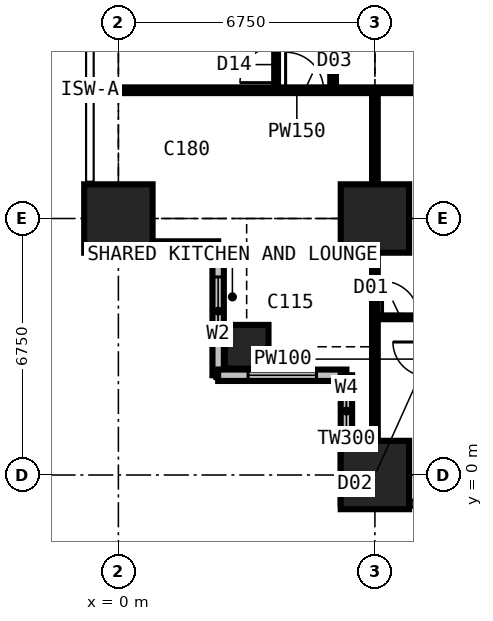
"""IFC4 building model, lengths in metres.
Left out: names, types, materials, properties, quantities, classifications, styles, units other than length and angle.
Written with IfcOpenShell. Run it as: python <this file> out.ifc"""

import sys

from ifc_helpers import new_model, si_unit, direction, frame, frame_2d, origin, origin_2d, place, context, subcontext, project, spatial, rectangle, extrude, element, fill, save


model = new_model("IFC4")
c1 = context("Model", 3, precision=1e-05, world=origin(), true_north=direction((0.0, 1.0)))
c2 = subcontext(c1, "Body", "Model", "MODEL_VIEW")
j1 = project(units=[si_unit("LENGTHUNIT", "METRE"), si_unit("PLANEANGLEUNIT", "RADIAN")], contexts=[c1])
p1 = place(None, origin())
s1 = spatial("IfcSite", under=j1, at=p1, CompositionType="ELEMENT")
p2 = place(p1, origin())
s2 = spatial("IfcBuilding", under=s1, at=p2, CompositionType="ELEMENT")
p3 = place(p2, frame((0.0, 0.0, 61.2)))
s3 = spatial("IfcBuildingStorey", under=s2, at=p3, CompositionType="ELEMENT", Elevation=61.2)
p4 = place(p3, frame((0.0, 6.75, 0.0), z_axis=(0.0, 0.0, 1.0), x_axis=(1.0, 0.0, 0.0)))
e1 = element("IfcColumn", 1, at=p4, inside=s3, PredefinedType="COLUMN", context=c2, shape_type="SweptSolid", body=[
    extrude(rectangle(XDim=1.8, YDim=1.8, at=origin_2d()), origin(), (0.0, 0.0, 1.0), 3.6),
])
p5 = place(p3, frame((3.375, 3.375, 0.0), z_axis=(0.0, 0.0, 1.0), x_axis=(1.0, 0.0, 0.0)))
e2 = element("IfcColumn", 2, at=p5, inside=s3, PredefinedType="COLUMN", context=c2, shape_type="SweptSolid", body=[
    extrude(rectangle(XDim=1.15, YDim=1.15, at=origin_2d()), origin(), (0.0, 0.0, 1.0), 3.6),
])
for number, where, z_axis, x_axis in (
    (3, (6.75, 0.0, 0.0), (0.0, 0.0, 1.0), (1.0, 0.0, 0.0)),
    (4, (6.75, 6.75, 0.0), (0.0, 0.0, 1.0), (1.0, 0.0, 0.0)),
):
    element("IfcColumn", number, at=place(p3, frame(where, z_axis=z_axis, x_axis=x_axis)), inside=s3, PredefinedType="COLUMN", context=c2, shape_type="SweptSolid", body=[
        extrude(rectangle(XDim=1.8, YDim=1.8, at=origin_2d()), origin(), (0.0, 0.0, 1.0), 3.6),
    ])
p6 = place(p3, frame((-0.75, 6.0, 0.0), z_axis=(0.0, 0.0, 1.0), x_axis=(1.0, 0.0, 0.0)))
e5 = element("IfcWall", 5, at=p6, inside=s3, PredefinedType="SOLIDWALL", context=c2, shape_type="SweptSolid", body=[
    extrude(rectangle(XDim=3.375, YDim=0.3, at=frame_2d((1.688, 0.0))), origin(), (0.0, 0.0, 1.0), 3.375),
])
p7 = place(p6, frame((1.833, 0.0, 0.9)))
e6 = element("IfcOpeningElement", 6, at=p7, cuts=e5, PredefinedType="OPENING", context=c2, shape_type="SweptSolid", body=[
    extrude(rectangle(XDim=1.2, YDim=1.8, at=frame_2d((0.6, 0.9))), frame((0.0, 0.16, 0.0), z_axis=(0.0, -1.0, 0.0), x_axis=(1.0, 0.0, 0.0)), (0.0, 0.0, 1.0), 0.32),
])
p8 = place(p3, frame((2.625, 6.0, 0.0), z_axis=(0.0, 0.0, 1.0), x_axis=(0.0, -1.0, 0.0)))
e7 = element("IfcWall", 7, at=p8, inside=s3, PredefinedType="SOLIDWALL", context=c2, shape_type="SweptSolid", body=[
    extrude(rectangle(XDim=3.375, YDim=0.3, at=frame_2d((1.688, 0.0))), origin(), (0.0, 0.0, 1.0), 3.375),
])
p9 = place(p8, frame((0.788, 0.0, 0.6)))
e8 = element("IfcOpeningElement", 8, at=p9, cuts=e7, PredefinedType="OPENING", context=c2, shape_type="SweptSolid", body=[
    extrude(rectangle(XDim=1.8, YDim=2.1, at=frame_2d((0.9, 1.05))), frame((0.0, 0.16, 0.0), z_axis=(0.0, -1.0, 0.0), x_axis=(1.0, 0.0, 0.0)), (0.0, 0.0, 1.0), 0.32),
])
p10 = place(p3, frame((2.625, 2.625, 0.0), z_axis=(0.0, 0.0, 1.0), x_axis=(1.0, 0.0, 0.0)))
e9 = element("IfcWall", 9, at=p10, inside=s3, PredefinedType="SOLIDWALL", context=c2, shape_type="SweptSolid", body=[
    extrude(rectangle(XDim=3.375, YDim=0.3, at=frame_2d((1.688, 0.0))), origin(), (0.0, 0.0, 1.0), 3.375),
])
p11 = place(p10, frame((0.788, 0.0, 0.6)))
e10 = element("IfcOpeningElement", 10, at=p11, cuts=e9, PredefinedType="OPENING", context=c2, shape_type="SweptSolid", body=[
    extrude(rectangle(XDim=1.8, YDim=2.1, at=frame_2d((0.9, 1.05))), frame((0.0, 0.16, 0.0), z_axis=(0.0, -1.0, 0.0), x_axis=(1.0, 0.0, 0.0)), (0.0, 0.0, 1.0), 0.32),
])
p12 = place(p3, frame((6.0, 2.625, 0.0), z_axis=(0.0, 0.0, 1.0), x_axis=(0.0, -1.0, 0.0)))
e11 = element("IfcWall", 11, at=p12, inside=s3, PredefinedType="SOLIDWALL", context=c2, shape_type="SweptSolid", body=[
    extrude(rectangle(XDim=3.375, YDim=0.3, at=frame_2d((1.688, 0.0))), origin(), (0.0, 0.0, 1.0), 3.375),
])
p13 = place(p12, frame((0.343, 0.0, 0.9)))
e12 = element("IfcOpeningElement", 12, at=p13, cuts=e11, PredefinedType="OPENING", context=c2, shape_type="SweptSolid", body=[
    extrude(rectangle(XDim=1.2, YDim=1.8, at=frame_2d((0.6, 0.9))), frame((0.0, 0.16, 0.0), z_axis=(0.0, -1.0, 0.0), x_axis=(1.0, 0.0, 0.0)), (0.0, 0.0, 1.0), 0.32),
])
p14 = place(p3, frame((-0.734, 10.125, 0.0), z_axis=(0.0, 0.0, 1.0), x_axis=(1.0, 0.0, 0.0)))
e13 = element("IfcWall", 13, at=p14, inside=s3, PredefinedType="PARTITIONING", context=c2, shape_type="SweptSolid", body=[
    extrude(rectangle(XDim=10.859, YDim=0.15, at=frame_2d((5.429, 0.0))), origin(), (0.0, 0.0, 1.0), 3.375),
])
p15 = place(p14, frame((5.134, 0.0, 0.0)))
e14 = element("IfcOpeningElement", 14, at=p15, cuts=e13, PredefinedType="OPENING", context=c2, shape_type="SweptSolid", body=[
    extrude(rectangle(XDim=1.0, YDim=2.2, at=frame_2d((0.5, 1.1))), frame((0.0, 0.085, 0.0), z_axis=(0.0, -1.0, 0.0), x_axis=(1.0, 0.0, 0.0)), (0.0, 0.0, 1.0), 0.17),
])
p16 = place(p3, frame((4.15, 10.125, 0.0), z_axis=(0.0, 0.0, 1.0), x_axis=(0.0, 1.0, 0.0)))
e15 = element("IfcWall", 15, at=p16, inside=s3, PredefinedType="PARTITIONING", context=c2, shape_type="SweptSolid", body=[
    extrude(rectangle(XDim=23.625, YDim=0.1, at=frame_2d((11.812, 0.0))), origin(), (0.0, 0.0, 1.0), 3.375),
])
p17 = place(p16, frame((0.2, 0.0, 0.0)))
e16 = element("IfcOpeningElement", 16, at=p17, cuts=e15, PredefinedType="OPENING", context=c2, shape_type="SweptSolid", body=[
    extrude(rectangle(XDim=0.95, YDim=2.2, at=frame_2d((0.475, 1.1))), frame((0.0, 0.06, 0.0), z_axis=(0.0, -1.0, 0.0), x_axis=(1.0, 0.0, 0.0)), (0.0, 0.0, 1.0), 0.12),
])
p18 = place(p16, frame((3.625, 0.0, 0.0)))
e17 = element("IfcOpeningElement", 17, at=p18, cuts=e15, PredefinedType="OPENING", context=c2, shape_type="SweptSolid", body=[
    extrude(rectangle(XDim=0.95, YDim=2.2, at=frame_2d((0.475, 1.1))), frame((0.0, 0.06, 0.0), z_axis=(0.0, -1.0, 0.0), x_axis=(1.0, 0.0, 0.0)), (0.0, 0.0, 1.0), 0.12),
])
p19 = place(p16, frame((7.0, 0.0, 0.0)))
e18 = element("IfcOpeningElement", 18, at=p19, cuts=e15, PredefinedType="OPENING", context=c2, shape_type="SweptSolid", body=[
    extrude(rectangle(XDim=0.95, YDim=2.2, at=frame_2d((0.475, 1.1))), frame((0.0, 0.06, 0.0), z_axis=(0.0, -1.0, 0.0), x_axis=(1.0, 0.0, 0.0)), (0.0, 0.0, 1.0), 0.12),
])
p20 = place(p16, frame((10.375, 0.0, 0.0)))
e19 = element("IfcOpeningElement", 19, at=p20, cuts=e15, PredefinedType="OPENING", context=c2, shape_type="SweptSolid", body=[
    extrude(rectangle(XDim=0.95, YDim=2.2, at=frame_2d((0.475, 1.1))), frame((0.0, 0.06, 0.0), z_axis=(0.0, -1.0, 0.0), x_axis=(1.0, 0.0, 0.0)), (0.0, 0.0, 1.0), 0.12),
])
p21 = place(p16, frame((13.75, 0.0, 0.0)))
e20 = element("IfcOpeningElement", 20, at=p21, cuts=e15, PredefinedType="OPENING", context=c2, shape_type="SweptSolid", body=[
    extrude(rectangle(XDim=0.95, YDim=2.2, at=frame_2d((0.475, 1.1))), frame((0.0, 0.06, 0.0), z_axis=(0.0, -1.0, 0.0), x_axis=(1.0, 0.0, 0.0)), (0.0, 0.0, 1.0), 0.12),
])
p22 = place(p16, frame((17.125, 0.0, 0.0)))
e21 = element("IfcOpeningElement", 21, at=p22, cuts=e15, PredefinedType="OPENING", context=c2, shape_type="SweptSolid", body=[
    extrude(rectangle(XDim=0.95, YDim=2.2, at=frame_2d((0.475, 1.1))), frame((0.0, 0.06, 0.0), z_axis=(0.0, -1.0, 0.0), x_axis=(1.0, 0.0, 0.0)), (0.0, 0.0, 1.0), 0.12),
])
p23 = place(p3, frame((5.65, 10.125, 0.0), z_axis=(0.0, 0.0, 1.0), x_axis=(0.0, 1.0, 0.0)))
e22 = element("IfcWall", 22, at=p23, inside=s3, PredefinedType="PARTITIONING", context=c2, shape_type="SweptSolid", body=[
    extrude(rectangle(XDim=10.762, YDim=0.15, at=frame_2d((5.381, 0.0))), origin(), (0.0, 0.0, 1.0), 3.375),
])
p24 = place(p23, frame((4.9, 0.0, 0.0)))
e23 = element("IfcOpeningElement", 23, at=p24, cuts=e22, PredefinedType="OPENING", context=c2, shape_type="SweptSolid", body=[
    extrude(rectangle(XDim=0.95, YDim=2.2, at=frame_2d((0.475, 1.1))), frame((0.0, 0.085, 0.0), z_axis=(0.0, -1.0, 0.0), x_axis=(1.0, 0.0, 0.0)), (0.0, 0.0, 1.0), 0.17),
])
p25 = place(p3, frame((6.75, -0.734, 0.0), z_axis=(0.0, 0.0, 1.0), x_axis=(0.0, 1.0, 0.0)))
e24 = element("IfcWall", 24, at=p25, inside=s3, PredefinedType="PARTITIONING", context=c2, shape_type="SweptSolid", body=[
    extrude(rectangle(XDim=10.859, YDim=0.15, at=frame_2d((5.429, 0.0))), origin(), (0.0, 0.0, 1.0), 2.877),
])
p26 = place(p3, frame((6.75, 4.15, 0.0), z_axis=(0.0, 0.0, 1.0), x_axis=(1.0, 0.0, 0.0)))
e25 = element("IfcWall", 25, at=p26, inside=s3, PredefinedType="PARTITIONING", context=c2, shape_type="SweptSolid", body=[
    extrude(rectangle(XDim=23.625, YDim=0.1, at=frame_2d((11.812, 0.0))), origin(), (0.0, 0.0, 1.0), 3.375),
])
p27 = place(p26, frame((0.2, 0.0, 0.0)))
e26 = element("IfcOpeningElement", 26, at=p27, cuts=e25, PredefinedType="OPENING", context=c2, shape_type="SweptSolid", body=[
    extrude(rectangle(XDim=0.95, YDim=2.2, at=frame_2d((0.475, 1.1))), frame((0.0, 0.06, 0.0), z_axis=(0.0, -1.0, 0.0), x_axis=(1.0, 0.0, 0.0)), (0.0, 0.0, 1.0), 0.12),
])
p28 = place(p26, frame((3.625, 0.0, 0.0)))
e27 = element("IfcOpeningElement", 27, at=p28, cuts=e25, PredefinedType="OPENING", context=c2, shape_type="SweptSolid", body=[
    extrude(rectangle(XDim=0.95, YDim=2.2, at=frame_2d((0.475, 1.1))), frame((0.0, 0.06, 0.0), z_axis=(0.0, -1.0, 0.0), x_axis=(1.0, 0.0, 0.0)), (0.0, 0.0, 1.0), 0.12),
])
p29 = place(p26, frame((7.0, 0.0, 0.0)))
e28 = element("IfcOpeningElement", 28, at=p29, cuts=e25, PredefinedType="OPENING", context=c2, shape_type="SweptSolid", body=[
    extrude(rectangle(XDim=0.95, YDim=2.2, at=frame_2d((0.475, 1.1))), frame((0.0, 0.06, 0.0), z_axis=(0.0, -1.0, 0.0), x_axis=(1.0, 0.0, 0.0)), (0.0, 0.0, 1.0), 0.12),
])
p30 = place(p26, frame((10.325, 0.0, 0.0)))
e29 = element("IfcOpeningElement", 29, at=p30, cuts=e25, PredefinedType="OPENING", context=c2, shape_type="SweptSolid", body=[
    extrude(rectangle(XDim=0.95, YDim=2.2, at=frame_2d((0.475, 1.1))), frame((0.0, 0.06, 0.0), z_axis=(0.0, -1.0, 0.0), x_axis=(1.0, 0.0, 0.0)), (0.0, 0.0, 1.0), 0.12),
])
p31 = place(p26, frame((13.75, 0.0, 0.0)))
e30 = element("IfcOpeningElement", 30, at=p31, cuts=e25, PredefinedType="OPENING", context=c2, shape_type="SweptSolid", body=[
    extrude(rectangle(XDim=0.95, YDim=2.2, at=frame_2d((0.475, 1.1))), frame((0.0, 0.06, 0.0), z_axis=(0.0, -1.0, 0.0), x_axis=(1.0, 0.0, 0.0)), (0.0, 0.0, 1.0), 0.12),
])
p32 = place(p26, frame((17.125, 0.0, 0.0)))
e31 = element("IfcOpeningElement", 31, at=p32, cuts=e25, PredefinedType="OPENING", context=c2, shape_type="SweptSolid", body=[
    extrude(rectangle(XDim=0.95, YDim=2.2, at=frame_2d((0.475, 1.1))), frame((0.0, 0.06, 0.0), z_axis=(0.0, -1.0, 0.0), x_axis=(1.0, 0.0, 0.0)), (0.0, 0.0, 1.0), 0.12),
])
p33 = place(p26, frame((20.5, 0.0, 0.0)))
e32 = element("IfcOpeningElement", 32, at=p33, cuts=e25, PredefinedType="OPENING", context=c2, shape_type="SweptSolid", body=[
    extrude(rectangle(XDim=0.95, YDim=2.2, at=frame_2d((0.475, 1.1))), frame((0.0, 0.06, 0.0), z_axis=(0.0, -1.0, 0.0), x_axis=(1.0, 0.0, 0.0)), (0.0, 0.0, 1.0), 0.12),
])
p34 = place(p7, origin())
e33 = element("IfcWindow", 33, at=p34, inside=s3, PartitioningType="SINGLE_PANEL", PredefinedType="WINDOW", context=c2, shape_type="SweptSolid", body=[
    extrude(rectangle(XDim=1.2, YDim=1.8, at=frame_2d((0.6, 0.9))), frame((0.0, 0.03, 0.0), z_axis=(0.0, -1.0, 0.0), x_axis=(1.0, 0.0, 0.0)), (0.0, 0.0, 1.0), 0.06),
])
fill(e6, e33)
p35 = place(p9, origin())
e34 = element("IfcWindow", 34, at=p35, inside=s3, PartitioningType="SINGLE_PANEL", PredefinedType="WINDOW", context=c2, shape_type="SweptSolid", body=[
    extrude(rectangle(XDim=1.8, YDim=2.1, at=frame_2d((0.9, 1.05))), frame((0.0, 0.03, 0.0), z_axis=(0.0, -1.0, 0.0), x_axis=(1.0, 0.0, 0.0)), (0.0, 0.0, 1.0), 0.06),
])
fill(e8, e34)
p36 = place(p11, origin())
e35 = element("IfcWindow", 35, at=p36, inside=s3, PartitioningType="SINGLE_PANEL", PredefinedType="WINDOW", context=c2, shape_type="SweptSolid", body=[
    extrude(rectangle(XDim=1.8, YDim=2.1, at=frame_2d((0.9, 1.05))), frame((0.0, 0.03, 0.0), z_axis=(0.0, -1.0, 0.0), x_axis=(1.0, 0.0, 0.0)), (0.0, 0.0, 1.0), 0.06),
])
fill(e10, e35)
p37 = place(p13, origin())
e36 = element("IfcWindow", 36, at=p37, inside=s3, PartitioningType="SINGLE_PANEL", PredefinedType="WINDOW", context=c2, shape_type="SweptSolid", body=[
    extrude(rectangle(XDim=1.2, YDim=1.8, at=frame_2d((0.6, 0.9))), frame((0.0, 0.03, 0.0), z_axis=(0.0, -1.0, 0.0), x_axis=(1.0, 0.0, 0.0)), (0.0, 0.0, 1.0), 0.06),
])
fill(e12, e36)
p38 = place(p15, origin())
e37 = element("IfcDoor", 37, at=p38, inside=s3, OperationType="SINGLE_SWING_LEFT", PredefinedType="DOOR", context=c2, shape_type="SweptSolid", body=[
    extrude(rectangle(XDim=1.0, YDim=2.2, at=frame_2d((0.5, 1.1))), frame((0.0, 0.025, 0.0), z_axis=(0.0, -1.0, 0.0), x_axis=(1.0, 0.0, 0.0)), (0.0, 0.0, 1.0), 0.05),
])
fill(e14, e37)
p39 = place(p27, origin())
e38 = element("IfcDoor", 38, at=p39, inside=s3, OperationType="SINGLE_SWING_LEFT", PredefinedType="DOOR", context=c2, shape_type="SweptSolid", body=[
    extrude(rectangle(XDim=0.95, YDim=2.2, at=frame_2d((0.475, 1.1))), frame((0.0, 0.025, 0.0), z_axis=(0.0, -1.0, 0.0), x_axis=(1.0, 0.0, 0.0)), (0.0, 0.0, 1.0), 0.05),
])
fill(e26, e38)
p40 = place(p17, origin())
e39 = element("IfcDoor", 39, at=p40, inside=s3, OperationType="SINGLE_SWING_LEFT", PredefinedType="DOOR", context=c2, shape_type="SweptSolid", body=[
    extrude(rectangle(XDim=0.95, YDim=2.2, at=frame_2d((0.475, 1.1))), frame((0.0, 0.025, 0.0), z_axis=(0.0, -1.0, 0.0), x_axis=(1.0, 0.0, 0.0)), (0.0, 0.0, 1.0), 0.05),
])
fill(e16, e39)
save(model, sys.argv[1])
